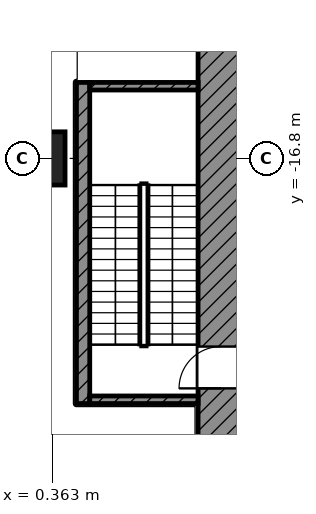
"""IFC4 building model, lengths in metres.
Left out: names, types, materials, properties, quantities, classifications, styles, units other than length and angle.
Written with IfcOpenShell. Run it as: python <this file> out.ifc"""

import sys

from ifc_helpers import new_model, si_unit, direction, frame, frame_2d, origin, origin_2d, place, context, subcontext, project, spatial, rectangle, extrude, element, fill, save


model = new_model("IFC4")
c1 = context("Model", 3, precision=1e-05, world=origin(), true_north=direction((0.0, 1.0)))
c2 = subcontext(c1, "Body", "Model", "MODEL_VIEW")
j1 = project(units=[si_unit("LENGTHUNIT", "METRE"), si_unit("PLANEANGLEUNIT", "RADIAN")], contexts=[c1])
p1 = place(None, origin())
s1 = spatial("IfcSite", under=j1, at=p1, CompositionType="ELEMENT")
p2 = place(p1, origin())
s2 = spatial("IfcBuilding", under=s1, at=p2, CompositionType="ELEMENT")
p3 = place(p2, frame((0.0, 0.0, 18.2)))
s3 = spatial("IfcBuildingStorey", under=s2, at=p3, CompositionType="ELEMENT", Elevation=18.2)
p4 = place(p3, frame((0.0, -16.8, 0.0), z_axis=(0.0, 0.0, 1.0), x_axis=(1.0, 0.0, 0.0)))
e1 = element("IfcColumn", 1, at=p4, inside=s3, PredefinedType="COLUMN", context=c2, shape_type="SweptSolid", body=[
    extrude(rectangle(XDim=1.4, YDim=1.4, at=origin_2d()), origin(), (0.0, 0.0, 1.0), 5.6),
])
p5 = place(p3, frame((4.8, -25.2, 0.0), z_axis=(0.0, 0.0, 1.0), x_axis=(0.0, 1.0, 0.0)))
e2 = element("IfcWall", 2, at=p5, inside=s3, PredefinedType="SHEAR", context=c2, shape_type="SweptSolid", body=[
    extrude(rectangle(XDim=19.8, YDim=1.2, at=frame_2d((9.9, 0.0))), origin(), (0.0, 0.0, 1.0), 5.05),
])
p6 = place(p5, frame((11.65, 0.0, 0.0)))
e3 = element("IfcOpeningElement", 3, at=p6, cuts=e2, PredefinedType="OPENING", context=c2, shape_type="SweptSolid", body=[
    extrude(rectangle(XDim=1.1, YDim=2.1, at=frame_2d((0.55, 1.05))), frame((0.0, 0.61, 0.0), z_axis=(0.0, -1.0, 0.0), x_axis=(1.0, 0.0, 0.0)), (0.0, 0.0, 1.0), 1.22),
])
p7 = place(p5, frame((2.35, 0.0, 0.0)))
e4 = element("IfcOpeningElement", 4, at=p7, cuts=e2, PredefinedType="OPENING", context=c2, shape_type="SweptSolid", body=[
    extrude(rectangle(XDim=1.1, YDim=2.1, at=frame_2d((0.55, 1.05))), frame((0.0, 0.61, 0.0), z_axis=(0.0, -1.0, 0.0), x_axis=(1.0, 0.0, 0.0)), (0.0, 0.0, 1.0), 1.22),
])
p8 = place(p3, frame((1.175, -23.25, 0.0), z_axis=(0.0, 0.0, 1.0), x_axis=(0.0, 1.0, 0.0)))
e5 = element("IfcWall", 5, at=p8, inside=s3, PredefinedType="SHEAR", context=c2, shape_type="SweptSolid", body=[
    extrude(rectangle(XDim=8.45, YDim=0.35, at=frame_2d((4.225, 0.0))), origin(), (0.0, 0.0, 1.0), 5.05),
])
for number, where, z_axis, x_axis in (
    (6, (1.35, -14.9, 0.0), (0.0, 0.0, 1.0), (1.0, 0.0, 0.0)),
    (7, (1.35, -23.15, 0.0), (0.0, 0.0, 1.0), (1.0, 0.0, 0.0)),
):
    element("IfcWall", number, at=place(p3, frame(where, z_axis=z_axis, x_axis=x_axis)), inside=s3, PredefinedType="SHEAR", context=c2, shape_type="SweptSolid", body=[
        extrude(rectangle(XDim=2.85, YDim=0.2, at=frame_2d((1.425, 0.0))), origin(), (0.0, 0.0, 1.0), 5.05),
    ])
p9 = place(p7, origin())
e8 = element("IfcDoor", 8, at=p9, inside=s3, OperationType="SINGLE_SWING_LEFT", PredefinedType="DOOR", context=c2, shape_type="SweptSolid", body=[
    extrude(rectangle(XDim=1.1, YDim=2.1, at=frame_2d((0.55, 1.05))), frame((0.0, 0.025, 0.0), z_axis=(0.0, -1.0, 0.0), x_axis=(1.0, 0.0, 0.0)), (0.0, 0.0, 1.0), 0.05),
])
fill(e4, e8)
save(model, sys.argv[1])
